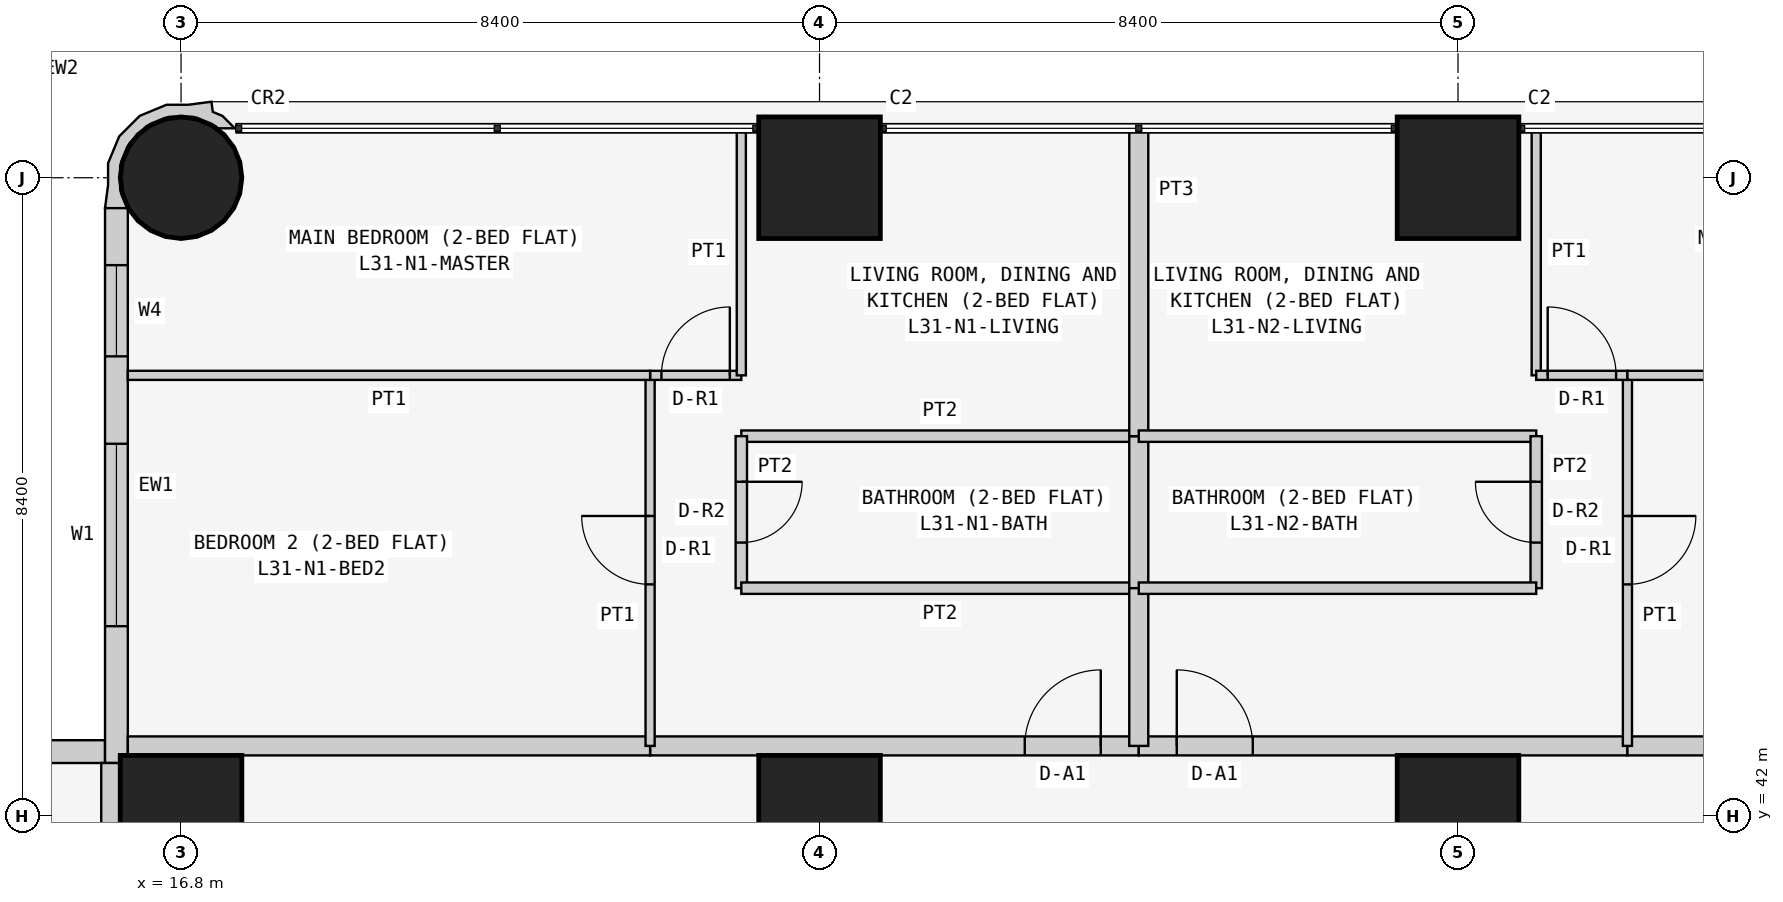
"""IFC4 building model, lengths in metres.
Left out: names, types, materials, properties, quantities, classifications, styles, units other than length and angle.
Written with IfcOpenShell. Run it as: python <this file> out.ifc"""

import sys

from ifc_helpers import new_model, si_unit, direction, frame, frame_2d, origin, origin_2d, place, context, subcontext, project, spatial, polyline, rectangle, circle, outline, extrude, element, fill, save


model = new_model("IFC4")
c1 = context("Model", 3, precision=1e-05, world=origin(), true_north=direction((0.0, 1.0)))
c2 = subcontext(c1, "Body", "Model", "MODEL_VIEW")
j1 = project(units=[si_unit("LENGTHUNIT", "METRE"), si_unit("PLANEANGLEUNIT", "RADIAN")], contexts=[c1])
p1 = place(None, origin())
s1 = spatial("IfcSite", under=j1, at=p1, CompositionType="ELEMENT")
p2 = place(p1, origin())
s2 = spatial("IfcBuilding", under=s1, at=p2, CompositionType="ELEMENT")
p3 = place(p2, frame((0.0, 0.0, 123.3)))
s3 = spatial("IfcBuildingStorey", under=s2, at=p3, CompositionType="ELEMENT", Elevation=123.3)
p4 = place(p3, frame((16.8, 42.0, 0.0), z_axis=(0.0, 0.0, 1.0), x_axis=(1.0, 0.0, 0.0)))
e1 = element("IfcColumn", 1, at=p4, inside=s3, PredefinedType="COLUMN", context=c2, shape_type="SweptSolid", body=[
    extrude(rectangle(XDim=1.6, YDim=1.6, at=origin_2d()), origin(), (0.0, 0.0, 1.0), 3.6),
])
p5 = place(p3, frame((16.8, 50.4, 0.0), z_axis=(0.0, 0.0, 1.0), x_axis=(1.0, 0.0, 0.0)))
e2 = element("IfcColumn", 2, at=p5, inside=s3, PredefinedType="COLUMN", context=c2, shape_type="SweptSolid", body=[
    extrude(circle(Radius=0.8, at=origin_2d()), origin(), (0.0, 0.0, 1.0), 3.6),
])
for number, where, z_axis, x_axis in (
    (3, (25.2, 42.0, 0.0), (0.0, 0.0, 1.0), (1.0, 0.0, 0.0)),
    (4, (25.2, 50.4, 0.0), (0.0, 0.0, 1.0), (1.0, 0.0, 0.0)),
    (5, (33.6, 42.0, 0.0), (0.0, 0.0, 1.0), (1.0, 0.0, 0.0)),
    (6, (33.6, 50.4, 0.0), (0.0, 0.0, 1.0), (1.0, 0.0, 0.0)),
):
    element("IfcColumn", number, at=place(p3, frame(where, z_axis=z_axis, x_axis=x_axis)), inside=s3, PredefinedType="COLUMN", context=c2, shape_type="SweptSolid", body=[
        extrude(rectangle(XDim=1.6, YDim=1.6, at=origin_2d()), origin(), (0.0, 0.0, 1.0), 3.6),
    ])
p6 = place(p3, frame((15.8, 42.85, 0.0), z_axis=(0.0, 0.0, 1.0), x_axis=(-1.0, 0.0, 0.0)))
e7 = element("IfcWall", 7, at=p6, inside=s3, PredefinedType="SOLIDWALL", context=c2, shape_type="SweptSolid", body=[
    extrude(rectangle(XDim=15.4, YDim=0.3, at=frame_2d((7.7, 0.0))), origin(), (0.0, 0.0, 1.0), 3.45),
])
p7 = place(p6, frame((1.2, 0.0, 0.9)))
e8 = element("IfcOpeningElement", 8, at=p7, cuts=e7, PredefinedType="OPENING", context=c2, shape_type="SweptSolid", body=[
    extrude(rectangle(XDim=1.8, YDim=1.5, at=frame_2d((0.9, 0.75))), frame((0.0, 0.16, 0.0), z_axis=(0.0, -1.0, 0.0), x_axis=(1.0, 0.0, 0.0)), (0.0, 0.0, 1.0), 0.32),
])
p8 = place(p6, frame((4.95, 0.0, 1.5)))
e9 = element("IfcOpeningElement", 9, at=p8, cuts=e7, PredefinedType="OPENING", context=c2, shape_type="SweptSolid", body=[
    extrude(rectangle(XDim=0.9, YDim=0.7, at=frame_2d((0.45, 0.35))), frame((0.0, 0.16, 0.0), z_axis=(0.0, -1.0, 0.0), x_axis=(1.0, 0.0, 0.0)), (0.0, 0.0, 1.0), 0.32),
])
p9 = place(p6, frame((8.5, 0.0, 0.9)))
e10 = element("IfcOpeningElement", 10, at=p9, cuts=e7, PredefinedType="OPENING", context=c2, shape_type="SweptSolid", body=[
    extrude(rectangle(XDim=1.8, YDim=1.5, at=frame_2d((0.9, 0.75))), frame((0.0, 0.16, 0.0), z_axis=(0.0, -1.0, 0.0), x_axis=(1.0, 0.0, 0.0)), (0.0, 0.0, 1.0), 0.32),
])
p10 = place(p6, frame((12.5, 0.0, 0.0)))
e11 = element("IfcOpeningElement", 11, at=p10, cuts=e7, PredefinedType="OPENING", context=c2, shape_type="SweptSolid", body=[
    extrude(rectangle(XDim=0.9, YDim=2.4, at=frame_2d((0.45, 1.2))), frame((0.0, 0.16, 0.0), z_axis=(0.0, -1.0, 0.0), x_axis=(1.0, 0.0, 0.0)), (0.0, 0.0, 1.0), 0.32),
])
p11 = place(p6, frame((13.5, 0.0, 0.9)))
e12 = element("IfcOpeningElement", 12, at=p11, cuts=e7, PredefinedType="OPENING", context=c2, shape_type="SweptSolid", body=[
    extrude(rectangle(XDim=1.2, YDim=1.5, at=frame_2d((0.6, 0.75))), frame((0.0, 0.16, 0.0), z_axis=(0.0, -1.0, 0.0), x_axis=(1.0, 0.0, 0.0)), (0.0, 0.0, 1.0), 0.32),
])
p12 = place(p3, frame((15.95, 50.0, 0.0), z_axis=(0.0, 0.0, 1.0), x_axis=(0.0, -1.0, 0.0)))
e13 = element("IfcWall", 13, at=p12, inside=s3, PredefinedType="SOLIDWALL", context=c2, shape_type="SweptSolid", body=[
    extrude(rectangle(XDim=7.3, YDim=0.3, at=frame_2d((3.65, 0.0))), origin(), (0.0, 0.0, 1.0), 3.45),
])
p13 = place(p12, frame((3.1, 0.0, 0.9)))
e14 = element("IfcOpeningElement", 14, at=p13, cuts=e13, PredefinedType="OPENING", context=c2, shape_type="SweptSolid", body=[
    extrude(rectangle(XDim=2.4, YDim=1.5, at=frame_2d((1.2, 0.75))), frame((0.0, 0.16, 0.0), z_axis=(0.0, -1.0, 0.0), x_axis=(1.0, 0.0, 0.0)), (0.0, 0.0, 1.0), 0.32),
])
p14 = place(p12, frame((0.75, 0.0, 0.9)))
e15 = element("IfcOpeningElement", 15, at=p14, cuts=e13, PredefinedType="OPENING", context=c2, shape_type="SweptSolid", body=[
    extrude(rectangle(XDim=1.2, YDim=1.5, at=frame_2d((0.6, 0.75))), frame((0.0, 0.16, 0.0), z_axis=(0.0, -1.0, 0.0), x_axis=(1.0, 0.0, 0.0)), (0.0, 0.0, 1.0), 0.32),
])
p15 = place(p3, frame((17.448, 50.995, 0.0), z_axis=(0.0, 0.0, 1.0), x_axis=(-0.343276641956, 0.93923434088, 0.0)))
e16 = element("IfcWall", 16, at=p15, inside=s3, PredefinedType="SOLIDWALL", context=c2, shape_type="SweptSolid", body=[
    extrude(outline(polyline([(0.241, 0.023), (0.333, 0.124), (0.465, 0.094), (0.532, 0.393), (0.631, 0.663), (0.614, 1.045), (0.454, 1.391), (0.172, 1.649), (-0.098, 1.748), (-0.369, 1.89), (-0.509, 1.621), (-0.491, 1.615), (-0.479, 1.609), (-0.211, 1.62), (0.088, 1.511), (0.323, 1.295), (0.457, 1.006), (0.47, 0.688), (0.361, 0.389), (0.145, 0.154), (0.108, 0.137), (0.031, -0.075), (0.241, 0.023)])), origin(), (0.0, 0.0, 1.0), 3.45),
])
p16 = place(p3, frame((22.971, 42.925, 0.0), z_axis=(0.0, 0.0, 1.0), x_axis=(1.0, 0.0, 0.0)))
e17 = element("IfcWall", 17, at=p16, inside=s3, PredefinedType="PARTITIONING", context=c2, shape_type="SweptSolid", body=[
    extrude(rectangle(XDim=6.429, YDim=0.25, at=frame_2d((3.214, 0.0))), origin(), (0.0, 0.0, 1.0), 3.45),
])
p17 = place(p16, frame((4.929, 0.0, 0.0)))
e18 = element("IfcOpeningElement", 18, at=p17, cuts=e17, PredefinedType="OPENING", context=c2, shape_type="SweptSolid", body=[
    extrude(rectangle(XDim=1.0, YDim=2.1, at=frame_2d((0.5, 1.05))), frame((0.0, 0.135, 0.0), z_axis=(0.0, -1.0, 0.0), x_axis=(1.0, 0.0, 0.0)), (0.0, 0.0, 1.0), 0.27),
])
p18 = place(p3, frame((16.1, 42.925, 0.0), z_axis=(0.0, 0.0, 1.0), x_axis=(1.0, 0.0, 0.0)))
e19 = element("IfcWall", 19, at=p18, inside=s3, PredefinedType="PARTITIONING", context=c2, shape_type="SweptSolid", body=[
    extrude(rectangle(XDim=6.871, YDim=0.25, at=frame_2d((3.436, 0.0))), origin(), (0.0, 0.0, 1.0), 3.45),
])
p19 = place(p3, frame((29.4, 42.925, 0.0), z_axis=(0.0, 0.0, 1.0), x_axis=(1.0, 0.0, 0.0)))
e20 = element("IfcWall", 20, at=p19, inside=s3, PredefinedType="PARTITIONING", context=c2, shape_type="SweptSolid", body=[
    extrude(rectangle(XDim=6.429, YDim=0.25, at=frame_2d((3.215, 0.0))), origin(), (0.0, 0.0, 1.0), 3.45),
])
p20 = place(p19, frame((0.5, 0.0, 0.0)))
e21 = element("IfcOpeningElement", 21, at=p20, cuts=e20, PredefinedType="OPENING", context=c2, shape_type="SweptSolid", body=[
    extrude(rectangle(XDim=1.0, YDim=2.1, at=frame_2d((0.5, 1.05))), frame((0.0, 0.135, 0.0), z_axis=(0.0, -1.0, 0.0), x_axis=(1.0, 0.0, 0.0)), (0.0, 0.0, 1.0), 0.27),
])
p21 = place(p3, frame((35.829, 42.925, 0.0), z_axis=(0.0, 0.0, 1.0), x_axis=(1.0, 0.0, 0.0)))
e22 = element("IfcWall", 22, at=p21, inside=s3, PredefinedType="PARTITIONING", context=c2, shape_type="SweptSolid", body=[
    extrude(rectangle(XDim=6.871, YDim=0.25, at=frame_2d((3.436, 0.0))), origin(), (0.0, 0.0, 1.0), 3.45),
])
p22 = place(p3, frame((15.875, 36.229, 0.0), z_axis=(0.0, 0.0, 1.0), x_axis=(0.0, 1.0, 0.0)))
e23 = element("IfcWall", 23, at=p22, inside=s3, PredefinedType="PARTITIONING", context=c2, shape_type="SweptSolid", body=[
    extrude(rectangle(XDim=6.471, YDim=0.25, at=frame_2d((3.235, 0.0))), origin(), (0.0, 0.0, 1.0), 3.45),
])
p23 = place(p3, frame((29.4, 47.0, 0.0), z_axis=(0.0, 0.0, 1.0), x_axis=(-1.0, 0.0, 0.0)))
e24 = element("IfcWall", 24, at=p23, inside=s3, PredefinedType="PARTITIONING", context=c2, shape_type="SweptSolid", body=[
    extrude(rectangle(XDim=5.229, YDim=0.15, at=frame_2d((2.615, 0.0))), origin(), (0.0, 0.0, 1.0), 3.45),
])
p24 = place(p3, frame((24.171, 47.0, 0.0), z_axis=(0.0, 0.0, 1.0), x_axis=(0.0, -1.0, 0.0)))
e25 = element("IfcWall", 25, at=p24, inside=s3, PredefinedType="PARTITIONING", context=c2, shape_type="SweptSolid", body=[
    extrude(rectangle(XDim=2.0, YDim=0.15, at=frame_2d((1.0, 0.0))), origin(), (0.0, 0.0, 1.0), 3.45),
])
p25 = place(p24, frame((0.6, 0.0, 0.0)))
e26 = element("IfcOpeningElement", 26, at=p25, cuts=e25, PredefinedType="OPENING", context=c2, shape_type="SweptSolid", body=[
    extrude(rectangle(XDim=0.8, YDim=2.1, at=frame_2d((0.4, 1.05))), frame((0.0, 0.085, 0.0), z_axis=(0.0, -1.0, 0.0), x_axis=(1.0, 0.0, 0.0)), (0.0, 0.0, 1.0), 0.17),
])
p26 = place(p3, frame((24.171, 45.0, 0.0), z_axis=(0.0, 0.0, 1.0), x_axis=(1.0, 0.0, 0.0)))
e27 = element("IfcWall", 27, at=p26, inside=s3, PredefinedType="PARTITIONING", context=c2, shape_type="SweptSolid", body=[
    extrude(rectangle(XDim=5.229, YDim=0.15, at=frame_2d((2.615, 0.0))), origin(), (0.0, 0.0, 1.0), 3.45),
])
p27 = place(p3, frame((29.4, 45.0, 0.0), z_axis=(0.0, 0.0, 1.0), x_axis=(0.0, 1.0, 0.0)))
e28 = element("IfcWall", 28, at=p27, inside=s3, PredefinedType="PARTITIONING", context=c2, shape_type="SweptSolid", body=[
    extrude(rectangle(XDim=2.0, YDim=0.25, at=frame_2d((1.0, 0.0))), origin(), (0.0, 0.0, 1.0), 2.848),
])
p28 = place(p3, frame((22.971, 42.925, 0.0), z_axis=(0.0, 0.0, 1.0), x_axis=(0.0, 1.0, 0.0)))
e29 = element("IfcWall", 29, at=p28, inside=s3, PredefinedType="PARTITIONING", context=c2, shape_type="SweptSolid", body=[
    extrude(rectangle(XDim=4.875, YDim=0.12, at=frame_2d((2.438, 0.0))), origin(), (0.0, 0.0, 1.0), 3.45),
])
p29 = place(p28, frame((2.125, 0.0, 0.0)))
e30 = element("IfcOpeningElement", 30, at=p29, cuts=e29, PredefinedType="OPENING", context=c2, shape_type="SweptSolid", body=[
    extrude(rectangle(XDim=0.9, YDim=2.1, at=frame_2d((0.45, 1.05))), frame((0.0, 0.07, 0.0), z_axis=(0.0, -1.0, 0.0), x_axis=(1.0, 0.0, 0.0)), (0.0, 0.0, 1.0), 0.14),
])
p30 = place(p3, frame((22.971, 47.8, 0.0), z_axis=(0.0, 0.0, 1.0), x_axis=(1.0, 0.0, 0.0)))
e31 = element("IfcWall", 31, at=p30, inside=s3, PredefinedType="PARTITIONING", context=c2, shape_type="SweptSolid", body=[
    extrude(rectangle(XDim=1.2, YDim=0.12, at=frame_2d((0.6, 0.0))), origin(), (0.0, 0.0, 1.0), 3.45),
])
p31 = place(p30, frame((0.149, 0.0, 0.0)))
e32 = element("IfcOpeningElement", 32, at=p31, cuts=e31, PredefinedType="OPENING", context=c2, shape_type="SweptSolid", body=[
    extrude(rectangle(XDim=0.9, YDim=2.1, at=frame_2d((0.45, 1.05))), frame((0.0, 0.07, 0.0), z_axis=(0.0, -1.0, 0.0), x_axis=(1.0, 0.0, 0.0)), (0.0, 0.0, 1.0), 0.14),
])
p32 = place(p3, frame((24.171, 47.8, 0.0), z_axis=(0.0, 0.0, 1.0), x_axis=(0.0, 1.0, 0.0)))
e33 = element("IfcWall", 33, at=p32, inside=s3, PredefinedType="PARTITIONING", context=c2, shape_type="SweptSolid", body=[
    extrude(rectangle(XDim=3.25, YDim=0.12, at=frame_2d((1.625, 0.0))), origin(), (0.0, 0.0, 1.0), 3.45),
])
p33 = place(p3, frame((29.4, 45.0, 0.0), z_axis=(0.0, 0.0, 1.0), x_axis=(0.0, -1.0, 0.0)))
e34 = element("IfcWall", 34, at=p33, inside=s3, PredefinedType="PARTITIONING", context=c2, shape_type="SweptSolid", body=[
    extrude(rectangle(XDim=2.075, YDim=0.25, at=frame_2d((1.038, 0.0))), origin(), (0.0, 0.0, 1.0), 2.848),
])
p34 = place(p3, frame((29.4, 51.05, 0.0), z_axis=(0.0, 0.0, 1.0), x_axis=(0.0, -1.0, 0.0)))
e35 = element("IfcWall", 35, at=p34, inside=s3, PredefinedType="PARTITIONING", context=c2, shape_type="SweptSolid", body=[
    extrude(rectangle(XDim=4.05, YDim=0.25, at=frame_2d((2.025, 0.0))), origin(), (0.0, 0.0, 1.0), 2.848),
])
p35 = place(p3, frame((22.971, 47.8, 0.0), z_axis=(0.0, 0.0, 1.0), x_axis=(-1.0, 0.0, 0.0)))
e36 = element("IfcWall", 36, at=p35, inside=s3, PredefinedType="PARTITIONING", context=c2, shape_type="SweptSolid", body=[
    extrude(rectangle(XDim=6.871, YDim=0.12, at=frame_2d((3.436, 0.0))), origin(), (0.0, 0.0, 1.0), 3.45),
])
p36 = place(p3, frame((29.4, 47.0, 0.0), z_axis=(0.0, 0.0, 1.0), x_axis=(1.0, 0.0, 0.0)))
e37 = element("IfcWall", 37, at=p36, inside=s3, PredefinedType="PARTITIONING", context=c2, shape_type="SweptSolid", body=[
    extrude(rectangle(XDim=5.229, YDim=0.15, at=frame_2d((2.615, 0.0))), origin(), (0.0, 0.0, 1.0), 3.45),
])
p37 = place(p3, frame((34.629, 47.0, 0.0), z_axis=(0.0, 0.0, 1.0), x_axis=(0.0, -1.0, 0.0)))
e38 = element("IfcWall", 38, at=p37, inside=s3, PredefinedType="PARTITIONING", context=c2, shape_type="SweptSolid", body=[
    extrude(rectangle(XDim=2.0, YDim=0.15, at=frame_2d((1.0, 0.0))), origin(), (0.0, 0.0, 1.0), 3.45),
])
p38 = place(p37, frame((0.6, 0.0, 0.0)))
e39 = element("IfcOpeningElement", 39, at=p38, cuts=e38, PredefinedType="OPENING", context=c2, shape_type="SweptSolid", body=[
    extrude(rectangle(XDim=0.8, YDim=2.1, at=frame_2d((0.4, 1.05))), frame((0.0, 0.085, 0.0), z_axis=(0.0, -1.0, 0.0), x_axis=(1.0, 0.0, 0.0)), (0.0, 0.0, 1.0), 0.17),
])
p39 = place(p3, frame((34.629, 45.0, 0.0), z_axis=(0.0, 0.0, 1.0), x_axis=(-1.0, 0.0, 0.0)))
e40 = element("IfcWall", 40, at=p39, inside=s3, PredefinedType="PARTITIONING", context=c2, shape_type="SweptSolid", body=[
    extrude(rectangle(XDim=5.229, YDim=0.15, at=frame_2d((2.615, 0.0))), origin(), (0.0, 0.0, 1.0), 3.45),
])
p40 = place(p3, frame((35.829, 47.8, 0.0), z_axis=(0.0, 0.0, 1.0), x_axis=(0.0, -1.0, 0.0)))
e41 = element("IfcWall", 41, at=p40, inside=s3, PredefinedType="PARTITIONING", context=c2, shape_type="SweptSolid", body=[
    extrude(rectangle(XDim=4.875, YDim=0.12, at=frame_2d((2.438, 0.0))), origin(), (0.0, 0.0, 1.0), 3.45),
])
p41 = place(p40, frame((1.85, 0.0, 0.0)))
e42 = element("IfcOpeningElement", 42, at=p41, cuts=e41, PredefinedType="OPENING", context=c2, shape_type="SweptSolid", body=[
    extrude(rectangle(XDim=0.9, YDim=2.1, at=frame_2d((0.45, 1.05))), frame((0.0, 0.07, 0.0), z_axis=(0.0, -1.0, 0.0), x_axis=(1.0, 0.0, 0.0)), (0.0, 0.0, 1.0), 0.14),
])
p42 = place(p3, frame((34.629, 51.05, 0.0), z_axis=(0.0, 0.0, 1.0), x_axis=(0.0, -1.0, 0.0)))
e43 = element("IfcWall", 43, at=p42, inside=s3, PredefinedType="PARTITIONING", context=c2, shape_type="SweptSolid", body=[
    extrude(rectangle(XDim=3.25, YDim=0.12, at=frame_2d((1.625, 0.0))), origin(), (0.0, 0.0, 1.0), 3.45),
])
p43 = place(p3, frame((34.629, 47.8, 0.0), z_axis=(0.0, 0.0, 1.0), x_axis=(1.0, 0.0, 0.0)))
e44 = element("IfcWall", 44, at=p43, inside=s3, PredefinedType="PARTITIONING", context=c2, shape_type="SweptSolid", body=[
    extrude(rectangle(XDim=1.2, YDim=0.12, at=frame_2d((0.6, 0.0))), origin(), (0.0, 0.0, 1.0), 3.45),
])
p44 = place(p43, frame((0.151, 0.0, 0.0)))
e45 = element("IfcOpeningElement", 45, at=p44, cuts=e44, PredefinedType="OPENING", context=c2, shape_type="SweptSolid", body=[
    extrude(rectangle(XDim=0.9, YDim=2.1, at=frame_2d((0.45, 1.05))), frame((0.0, 0.07, 0.0), z_axis=(0.0, -1.0, 0.0), x_axis=(1.0, 0.0, 0.0)), (0.0, 0.0, 1.0), 0.14),
])
p45 = place(p3, frame((35.829, 47.8, 0.0), z_axis=(0.0, 0.0, 1.0), x_axis=(1.0, 0.0, 0.0)))
e46 = element("IfcWall", 46, at=p45, inside=s3, PredefinedType="PARTITIONING", context=c2, shape_type="SweptSolid", body=[
    extrude(rectangle(XDim=6.871, YDim=0.12, at=frame_2d((3.436, 0.0))), origin(), (0.0, 0.0, 1.0), 3.45),
])
p46 = place(p13, origin())
e47 = element("IfcWindow", 47, at=p46, inside=s3, PartitioningType="SINGLE_PANEL", PredefinedType="WINDOW", context=c2, shape_type="SweptSolid", body=[
    extrude(rectangle(XDim=2.4, YDim=1.5, at=frame_2d((1.2, 0.75))), frame((0.0, 0.03, 0.0), z_axis=(0.0, -1.0, 0.0), x_axis=(1.0, 0.0, 0.0)), (0.0, 0.0, 1.0), 0.06),
])
fill(e14, e47)
p47 = place(p14, origin())
e48 = element("IfcWindow", 48, at=p47, inside=s3, PartitioningType="SINGLE_PANEL", PredefinedType="WINDOW", context=c2, shape_type="SweptSolid", body=[
    extrude(rectangle(XDim=1.2, YDim=1.5, at=frame_2d((0.6, 0.75))), frame((0.0, 0.03, 0.0), z_axis=(0.0, -1.0, 0.0), x_axis=(1.0, 0.0, 0.0)), (0.0, 0.0, 1.0), 0.06),
])
fill(e15, e48)
p48 = place(p17, origin())
e49 = element("IfcDoor", 49, at=p48, inside=s3, OperationType="SINGLE_SWING_RIGHT", PredefinedType="DOOR", context=c2, shape_type="SweptSolid", body=[
    extrude(rectangle(XDim=1.0, YDim=2.1, at=frame_2d((0.5, 1.05))), frame((0.0, 0.025, 0.0), z_axis=(0.0, -1.0, 0.0), x_axis=(1.0, 0.0, 0.0)), (0.0, 0.0, 1.0), 0.05),
])
fill(e18, e49)
p49 = place(p25, origin())
e50 = element("IfcDoor", 50, at=p49, inside=s3, OperationType="SINGLE_SWING_LEFT", PredefinedType="DOOR", context=c2, shape_type="SweptSolid", body=[
    extrude(rectangle(XDim=0.8, YDim=2.1, at=frame_2d((0.4, 1.05))), frame((0.0, 0.025, 0.0), z_axis=(0.0, -1.0, 0.0), x_axis=(1.0, 0.0, 0.0)), (0.0, 0.0, 1.0), 0.05),
])
fill(e26, e50)
p50 = place(p29, origin())
e51 = element("IfcDoor", 51, at=p50, inside=s3, OperationType="SINGLE_SWING_RIGHT", PredefinedType="DOOR", context=c2, shape_type="SweptSolid", body=[
    extrude(rectangle(XDim=0.9, YDim=2.1, at=frame_2d((0.45, 1.05))), frame((0.0, 0.025, 0.0), z_axis=(0.0, -1.0, 0.0), x_axis=(1.0, 0.0, 0.0)), (0.0, 0.0, 1.0), 0.05),
])
fill(e30, e51)
p51 = place(p31, origin())
e52 = element("IfcDoor", 52, at=p51, inside=s3, OperationType="SINGLE_SWING_RIGHT", PredefinedType="DOOR", context=c2, shape_type="SweptSolid", body=[
    extrude(rectangle(XDim=0.9, YDim=2.1, at=frame_2d((0.45, 1.05))), frame((0.0, 0.025, 0.0), z_axis=(0.0, -1.0, 0.0), x_axis=(1.0, 0.0, 0.0)), (0.0, 0.0, 1.0), 0.05),
])
fill(e32, e52)
p52 = place(p20, origin())
e53 = element("IfcDoor", 53, at=p52, inside=s3, OperationType="SINGLE_SWING_LEFT", PredefinedType="DOOR", context=c2, shape_type="SweptSolid", body=[
    extrude(rectangle(XDim=1.0, YDim=2.1, at=frame_2d((0.5, 1.05))), frame((0.0, 0.025, 0.0), z_axis=(0.0, -1.0, 0.0), x_axis=(1.0, 0.0, 0.0)), (0.0, 0.0, 1.0), 0.05),
])
fill(e21, e53)
p53 = place(p38, frame((0.8, 0.0, 0.0), z_axis=(0.0, 0.0, 1.0), x_axis=(-1.0, 0.0, 0.0)))
e54 = element("IfcDoor", 54, at=p53, inside=s3, OperationType="SINGLE_SWING_RIGHT", PredefinedType="DOOR", context=c2, shape_type="SweptSolid", body=[
    extrude(rectangle(XDim=0.8, YDim=2.1, at=frame_2d((0.4, 1.05))), frame((0.0, 0.025, 0.0), z_axis=(0.0, -1.0, 0.0), x_axis=(1.0, 0.0, 0.0)), (0.0, 0.0, 1.0), 0.05),
])
fill(e39, e54)
p54 = place(p41, origin())
e55 = element("IfcDoor", 55, at=p54, inside=s3, OperationType="SINGLE_SWING_LEFT", PredefinedType="DOOR", context=c2, shape_type="SweptSolid", body=[
    extrude(rectangle(XDim=0.9, YDim=2.1, at=frame_2d((0.45, 1.05))), frame((0.0, 0.025, 0.0), z_axis=(0.0, -1.0, 0.0), x_axis=(1.0, 0.0, 0.0)), (0.0, 0.0, 1.0), 0.05),
])
fill(e42, e55)
p55 = place(p44, origin())
e56 = element("IfcDoor", 56, at=p55, inside=s3, OperationType="SINGLE_SWING_LEFT", PredefinedType="DOOR", context=c2, shape_type="SweptSolid", body=[
    extrude(rectangle(XDim=0.9, YDim=2.1, at=frame_2d((0.45, 1.05))), frame((0.0, 0.025, 0.0), z_axis=(0.0, -1.0, 0.0), x_axis=(1.0, 0.0, 0.0)), (0.0, 0.0, 1.0), 0.05),
])
fill(e45, e56)
save(model, sys.argv[1])
